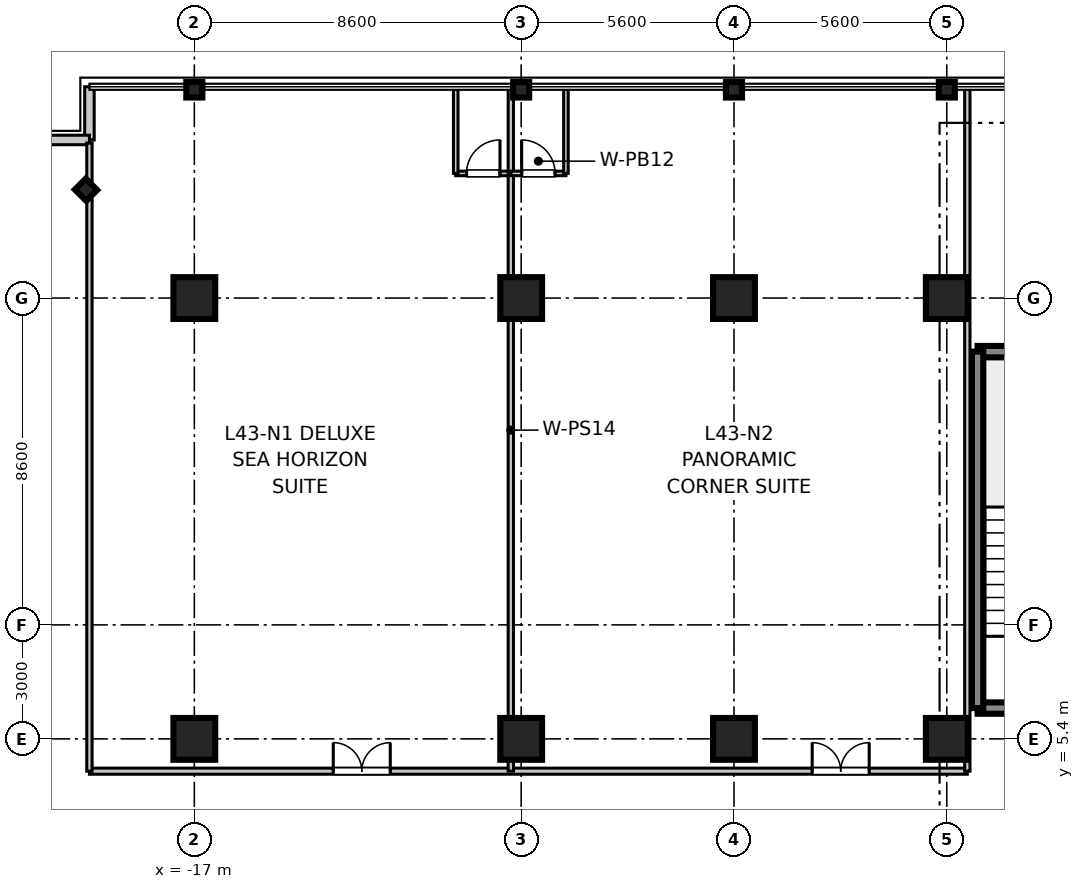
"""IFC4 building model, lengths in metres.
Left out: names, types, materials, properties, quantities, classifications, styles, units other than length and angle.
Written with IfcOpenShell. Run it as: python <this file> out.ifc"""

import sys

from ifc_helpers import new_model, si_unit, direction, frame, frame_2d, origin, origin_2d, place, context, subcontext, project, spatial, rectangle, i_section, extrude, source, transform, mapped, element, fill, save


model = new_model("IFC4")
c1 = context("Model", 3, precision=1e-05, world=origin(), true_north=direction((0.0, 1.0)))
c2 = subcontext(c1, "Body", "Model", "MODEL_VIEW")
j1 = project(units=[si_unit("LENGTHUNIT", "METRE"), si_unit("PLANEANGLEUNIT", "RADIAN")], contexts=[c1])
p1 = place(None, origin())
s1 = spatial("IfcSite", under=j1, at=p1, CompositionType="ELEMENT")
p2 = place(p1, origin())
s2 = spatial("IfcBuilding", under=s1, at=p2, CompositionType="ELEMENT")
p3 = place(p2, frame((0.0, 0.0, 170.9)))
s3 = spatial("IfcBuildingStorey", under=s2, at=p3, CompositionType="ELEMENT", Elevation=170.9)
m1 = source(origin(), c2, "Body", "SweptSolid", [
    extrude(rectangle(XDim=1.1, YDim=1.1, at=origin_2d()), origin(), (0.0, 0.0, 1.0), 3.605),
])
for number, where, z_axis, x_axis in (
    (1, (-17.0, 5.4, 0.0), (0.0, 0.0, 1.0), (1.0, 0.0, 0.0)),
    (2, (-17.0, 17.0, 0.0), (0.0, 0.0, 1.0), (1.0, 0.0, 0.0)),
    (3, (-8.4, 5.4, 0.0), (0.0, 0.0, 1.0), (1.0, 0.0, 0.0)),
    (4, (-8.4, 17.0, 0.0), (0.0, 0.0, 1.0), (1.0, 0.0, 0.0)),
    (5, (-2.8, 5.4, 0.0), (0.0, 0.0, 1.0), (1.0, 0.0, 0.0)),
    (6, (-2.8, 17.0, 0.0), (0.0, 0.0, 1.0), (1.0, 0.0, 0.0)),
    (7, (2.8, 5.4, 0.0), (0.0, 0.0, 1.0), (1.0, 0.0, 0.0)),
    (8, (2.8, 17.0, 0.0), (0.0, 0.0, 1.0), (1.0, 0.0, 0.0)),
):
    element("IfcColumn", number, at=place(p3, frame(where, z_axis=z_axis, x_axis=x_axis)), inside=s3, PredefinedType="COLUMN", context=c2, shape_type="MappedRepresentation", body=[
        mapped(m1, transform((0.0, 0.0, 0.0), scale=1.0)),
    ])
m2 = source(origin(), c2, "Body", "SweptSolid", [
    extrude(i_section(OverallWidth=0.406, OverallDepth=0.422, WebThickness=0.019, FlangeThickness=0.03, at=origin_2d()), origin(), (0.0, 0.0, 1.0), 3.605),
])
for number, where, z_axis, x_axis in (
    (9, (-17.0, 22.48, 0.0), (0.0, 0.0, 1.0), (0.0, 1.0, 0.0)),
    (10, (-8.4, 22.48, 0.0), (0.0, 0.0, 1.0), (0.0, 1.0, 0.0)),
    (11, (-2.8, 22.48, 0.0), (0.0, 0.0, 1.0), (0.0, 1.0, 0.0)),
    (12, (2.8, 22.48, 0.0), (0.0, 0.0, 1.0), (0.0, 1.0, 0.0)),
    (13, (-19.85, 19.85, 0.0), (0.0, 0.0, 1.0), (0.707, 0.707, 0.0)),
):
    element("IfcColumn", number, at=place(p3, frame(where, z_axis=z_axis, x_axis=x_axis)), inside=s3, PredefinedType="COLUMN", context=c2, shape_type="MappedRepresentation", body=[
        mapped(m2, transform((0.0, 0.0, 0.0), scale=1.0)),
    ])
m3 = source(origin(), c2, "Body", "SweptSolid", [
    extrude(rectangle(XDim=3.98, YDim=0.3, at=frame_2d((1.99, 0.0))), origin(), (0.0, 0.0, 1.0), 3.39),
])
for number, where, z_axis, x_axis in (
    (14, (3.61, 6.21, 0.0), (0.0, 0.0, 1.0), (1.0, 0.0, 0.0)),
    (15, (3.61, 15.59, 0.0), (0.0, 0.0, 1.0), (1.0, 0.0, 0.0)),
):
    element("IfcWall", number, at=place(p3, frame(where, z_axis=z_axis, x_axis=x_axis)), inside=s3, PredefinedType="SHEAR", context=c2, shape_type="MappedRepresentation", body=[
        mapped(m3, transform((0.0, 0.0, 0.0), scale=1.0)),
    ])
m4 = source(origin(), c2, "Body", "SweptSolid", [
    extrude(rectangle(XDim=9.38, YDim=0.3, at=frame_2d((4.69, 0.0))), origin(), (0.0, 0.0, 1.0), 3.39),
])
p4 = place(p3, frame((3.61, 6.21, 0.0), z_axis=(0.0, 0.0, 1.0), x_axis=(0.0, 1.0, 0.0)))
e16 = element("IfcWall", 16, at=p4, inside=s3, PredefinedType="SHEAR", context=c2, shape_type="MappedRepresentation", body=[
    mapped(m4, transform((0.0, 0.0, 0.0), scale=1.0)),
])
m5 = source(origin(), c2, "Body", "SweptSolid", [
    extrude(rectangle(XDim=1.4, YDim=0.25, at=frame_2d((0.7, 0.0))), origin(), (0.0, 0.0, 1.0), 3.39),
])
p5 = place(p3, frame((-19.76, 21.16, 0.0), z_axis=(0.0, 0.0, 1.0), x_axis=(0.0, 1.0, 0.0)))
e17 = element("IfcWall", 17, at=p5, inside=s3, PredefinedType="STANDARD", context=c2, shape_type="MappedRepresentation", body=[
    mapped(m5, transform((0.0, 0.0, 0.0), scale=1.0)),
])
m6 = source(origin(), c2, "Body", "SweptSolid", [
    extrude(rectangle(XDim=1.4, YDim=0.25, at=frame_2d((0.7, 0.0))), origin(), (0.0, 0.0, 1.0), 3.39),
])
p6 = place(p3, frame((-21.16, 21.16, 0.0), z_axis=(0.0, 0.0, 1.0), x_axis=(1.0, 0.0, 0.0)))
e18 = element("IfcWall", 18, at=p6, inside=s3, PredefinedType="STANDARD", context=c2, shape_type="MappedRepresentation", body=[
    mapped(m6, transform((0.0, 0.0, 0.0), scale=1.0)),
])
m7 = source(origin(), c2, "Body", "SweptSolid", [
    extrude(rectangle(XDim=23.1, YDim=0.16, at=frame_2d((11.55, 0.0))), origin(), (0.0, 0.0, 1.0), 2.73),
])
p7 = place(p3, frame((-19.76, 4.55, 0.0), z_axis=(0.0, 0.0, 1.0), x_axis=(1.0, 0.0, 0.0)))
e19 = element("IfcWall", 19, at=p7, inside=s3, PredefinedType="PARTITIONING", context=c2, shape_type="MappedRepresentation", body=[
    mapped(m7, transform((0.0, 0.0, 0.0), scale=1.0)),
])
p8 = place(p7, frame((6.416, 0.0, 0.0)))
e20 = element("IfcOpeningElement", 20, at=p8, cuts=e19, PredefinedType="OPENING", context=c2, shape_type="SweptSolid", body=[
    extrude(rectangle(XDim=1.5, YDim=2.15, at=frame_2d((0.75, 1.075))), frame((0.0, 0.09, 0.0), z_axis=(0.0, -1.0, 0.0), x_axis=(1.0, 0.0, 0.0)), (0.0, 0.0, 1.0), 0.18),
])
p9 = place(p7, frame((19.018, 0.0, 0.0)))
e21 = element("IfcOpeningElement", 21, at=p9, cuts=e19, PredefinedType="OPENING", context=c2, shape_type="SweptSolid", body=[
    extrude(rectangle(XDim=1.5, YDim=2.15, at=frame_2d((0.75, 1.075))), frame((0.0, 0.09, 0.0), z_axis=(0.0, -1.0, 0.0), x_axis=(1.0, 0.0, 0.0)), (0.0, 0.0, 1.0), 0.18),
])
m8 = source(origin(), c2, "Body", "SweptSolid", [
    extrude(rectangle(XDim=16.53, YDim=0.14, at=frame_2d((8.265, 0.0))), origin(), (0.0, 0.0, 1.0), 2.73),
])
p10 = place(p3, frame((-19.76, 4.55, 0.0), z_axis=(0.0, 0.0, 1.0), x_axis=(0.0, 1.0, 0.0)))
e22 = element("IfcWall", 22, at=p10, inside=s3, PredefinedType="PARTITIONING", context=c2, shape_type="MappedRepresentation", body=[
    mapped(m8, transform((0.0, 0.0, 0.0), scale=1.0)),
])
m9 = source(origin(), c2, "Body", "SweptSolid", [
    extrude(rectangle(XDim=17.95, YDim=0.14, at=frame_2d((8.975, 0.0))), origin(), (0.0, 0.0, 1.0), 2.73),
])
p11 = place(p3, frame((3.34, 4.55, 0.0), z_axis=(0.0, 0.0, 1.0), x_axis=(0.0, 1.0, 0.0)))
e23 = element("IfcWall", 23, at=p11, inside=s3, PredefinedType="PARTITIONING", context=c2, shape_type="MappedRepresentation", body=[
    mapped(m9, transform((0.0, 0.0, 0.0), scale=1.0)),
])
m10 = source(origin(), c2, "Body", "SweptSolid", [
    extrude(rectangle(XDim=1.45, YDim=0.12, at=frame_2d((0.725, 0.0))), origin(), (0.0, 0.0, 1.0), 2.73),
])
p12 = place(p3, frame((-10.122, 20.28, 0.0), z_axis=(0.0, 0.0, 1.0), x_axis=(1.0, 0.0, 0.0)))
e24 = element("IfcWall", 24, at=p12, inside=s3, PredefinedType="PARTITIONING", context=c2, shape_type="MappedRepresentation", body=[
    mapped(m10, transform((0.0, 0.0, 0.0), scale=1.0)),
])
p13 = place(p12, frame((0.285, 0.0, 0.0)))
e25 = element("IfcOpeningElement", 25, at=p13, cuts=e24, PredefinedType="OPENING", context=c2, shape_type="SweptSolid", body=[
    extrude(rectangle(XDim=0.88, YDim=2.1, at=frame_2d((0.44, 1.05))), frame((0.0, 0.07, 0.0), z_axis=(0.0, -1.0, 0.0), x_axis=(1.0, 0.0, 0.0)), (0.0, 0.0, 1.0), 0.14),
])
m11 = source(origin(), c2, "Body", "SweptSolid", [
    extrude(rectangle(XDim=2.22, YDim=0.12, at=frame_2d((1.11, 0.0))), origin(), (0.0, 0.0, 1.0), 2.73),
])
p14 = place(p3, frame((-10.122, 20.28, 0.0), z_axis=(0.0, 0.0, 1.0), x_axis=(0.0, 1.0, 0.0)))
e26 = element("IfcWall", 26, at=p14, inside=s3, PredefinedType="PARTITIONING", context=c2, shape_type="MappedRepresentation", body=[
    mapped(m11, transform((0.0, 0.0, 0.0), scale=1.0)),
])
p15 = place(p3, frame((-8.672, 4.55, 0.0), z_axis=(0.0, 0.0, 1.0), x_axis=(0.0, 1.0, 0.0)))
e27 = element("IfcWall", 27, at=p15, inside=s3, PredefinedType="PARTITIONING", context=c2, shape_type="MappedRepresentation", body=[
    mapped(m9, transform((0.0, 0.0, 0.0), scale=1.0)),
])
m12 = source(origin(), c2, "Body", "SweptSolid", [
    extrude(rectangle(XDim=1.45, YDim=0.12, at=frame_2d((0.725, 0.0))), origin(), (0.0, 0.0, 1.0), 2.73),
])
p16 = place(p3, frame((-8.672, 20.28, 0.0), z_axis=(0.0, 0.0, 1.0), x_axis=(1.0, 0.0, 0.0)))
e28 = element("IfcWall", 28, at=p16, inside=s3, PredefinedType="PARTITIONING", context=c2, shape_type="MappedRepresentation", body=[
    mapped(m12, transform((0.0, 0.0, 0.0), scale=1.0)),
])
p17 = place(p16, frame((0.285, 0.0, 0.0)))
e29 = element("IfcOpeningElement", 29, at=p17, cuts=e28, PredefinedType="OPENING", context=c2, shape_type="SweptSolid", body=[
    extrude(rectangle(XDim=0.88, YDim=2.1, at=frame_2d((0.44, 1.05))), frame((0.0, 0.07, 0.0), z_axis=(0.0, -1.0, 0.0), x_axis=(1.0, 0.0, 0.0)), (0.0, 0.0, 1.0), 0.14),
])
p18 = place(p3, frame((-7.222, 20.28, 0.0), z_axis=(0.0, 0.0, 1.0), x_axis=(0.0, 1.0, 0.0)))
e30 = element("IfcWall", 30, at=p18, inside=s3, PredefinedType="PARTITIONING", context=c2, shape_type="MappedRepresentation", body=[
    mapped(m11, transform((0.0, 0.0, 0.0), scale=1.0)),
])
m13 = source(origin(), c2, "Body", "SweptSolid", [
    extrude(rectangle(XDim=0.88, YDim=2.1, at=frame_2d((0.44, 1.05))), frame((0.0, 0.025, 0.0), z_axis=(0.0, -1.0, 0.0), x_axis=(1.0, 0.0, 0.0)), (0.0, 0.0, 1.0), 0.05),
])
p19 = place(p13, origin())
e31 = element("IfcDoor", 31, at=p19, inside=s3, OperationType="SINGLE_SWING_RIGHT", PredefinedType="DOOR", context=c2, shape_type="MappedRepresentation", body=[
    mapped(m13, transform((0.0, 0.0, 0.0), scale=1.0)),
])
fill(e25, e31)
m14 = source(origin(), c2, "Body", "SweptSolid", [
    extrude(rectangle(XDim=1.5, YDim=2.15, at=frame_2d((0.75, 1.075))), frame((0.0, 0.025, 0.0), z_axis=(0.0, -1.0, 0.0), x_axis=(1.0, 0.0, 0.0)), (0.0, 0.0, 1.0), 0.05),
])
p20 = place(p8, origin())
e32 = element("IfcDoor", 32, at=p20, inside=s3, OperationType="DOUBLE_DOOR_SINGLE_SWING", PredefinedType="DOOR", context=c2, shape_type="MappedRepresentation", body=[
    mapped(m14, transform((0.0, 0.0, 0.0), scale=1.0)),
])
fill(e20, e32)
p21 = place(p17, origin())
e33 = element("IfcDoor", 33, at=p21, inside=s3, OperationType="SINGLE_SWING_LEFT", PredefinedType="DOOR", context=c2, shape_type="MappedRepresentation", body=[
    mapped(m13, transform((0.0, 0.0, 0.0), scale=1.0)),
])
fill(e29, e33)
p22 = place(p9, origin())
e34 = element("IfcDoor", 34, at=p22, inside=s3, OperationType="DOUBLE_DOOR_SINGLE_SWING", PredefinedType="DOOR", context=c2, shape_type="MappedRepresentation", body=[
    mapped(m14, transform((0.0, 0.0, 0.0), scale=1.0)),
])
fill(e21, e34)
save(model, sys.argv[1])
